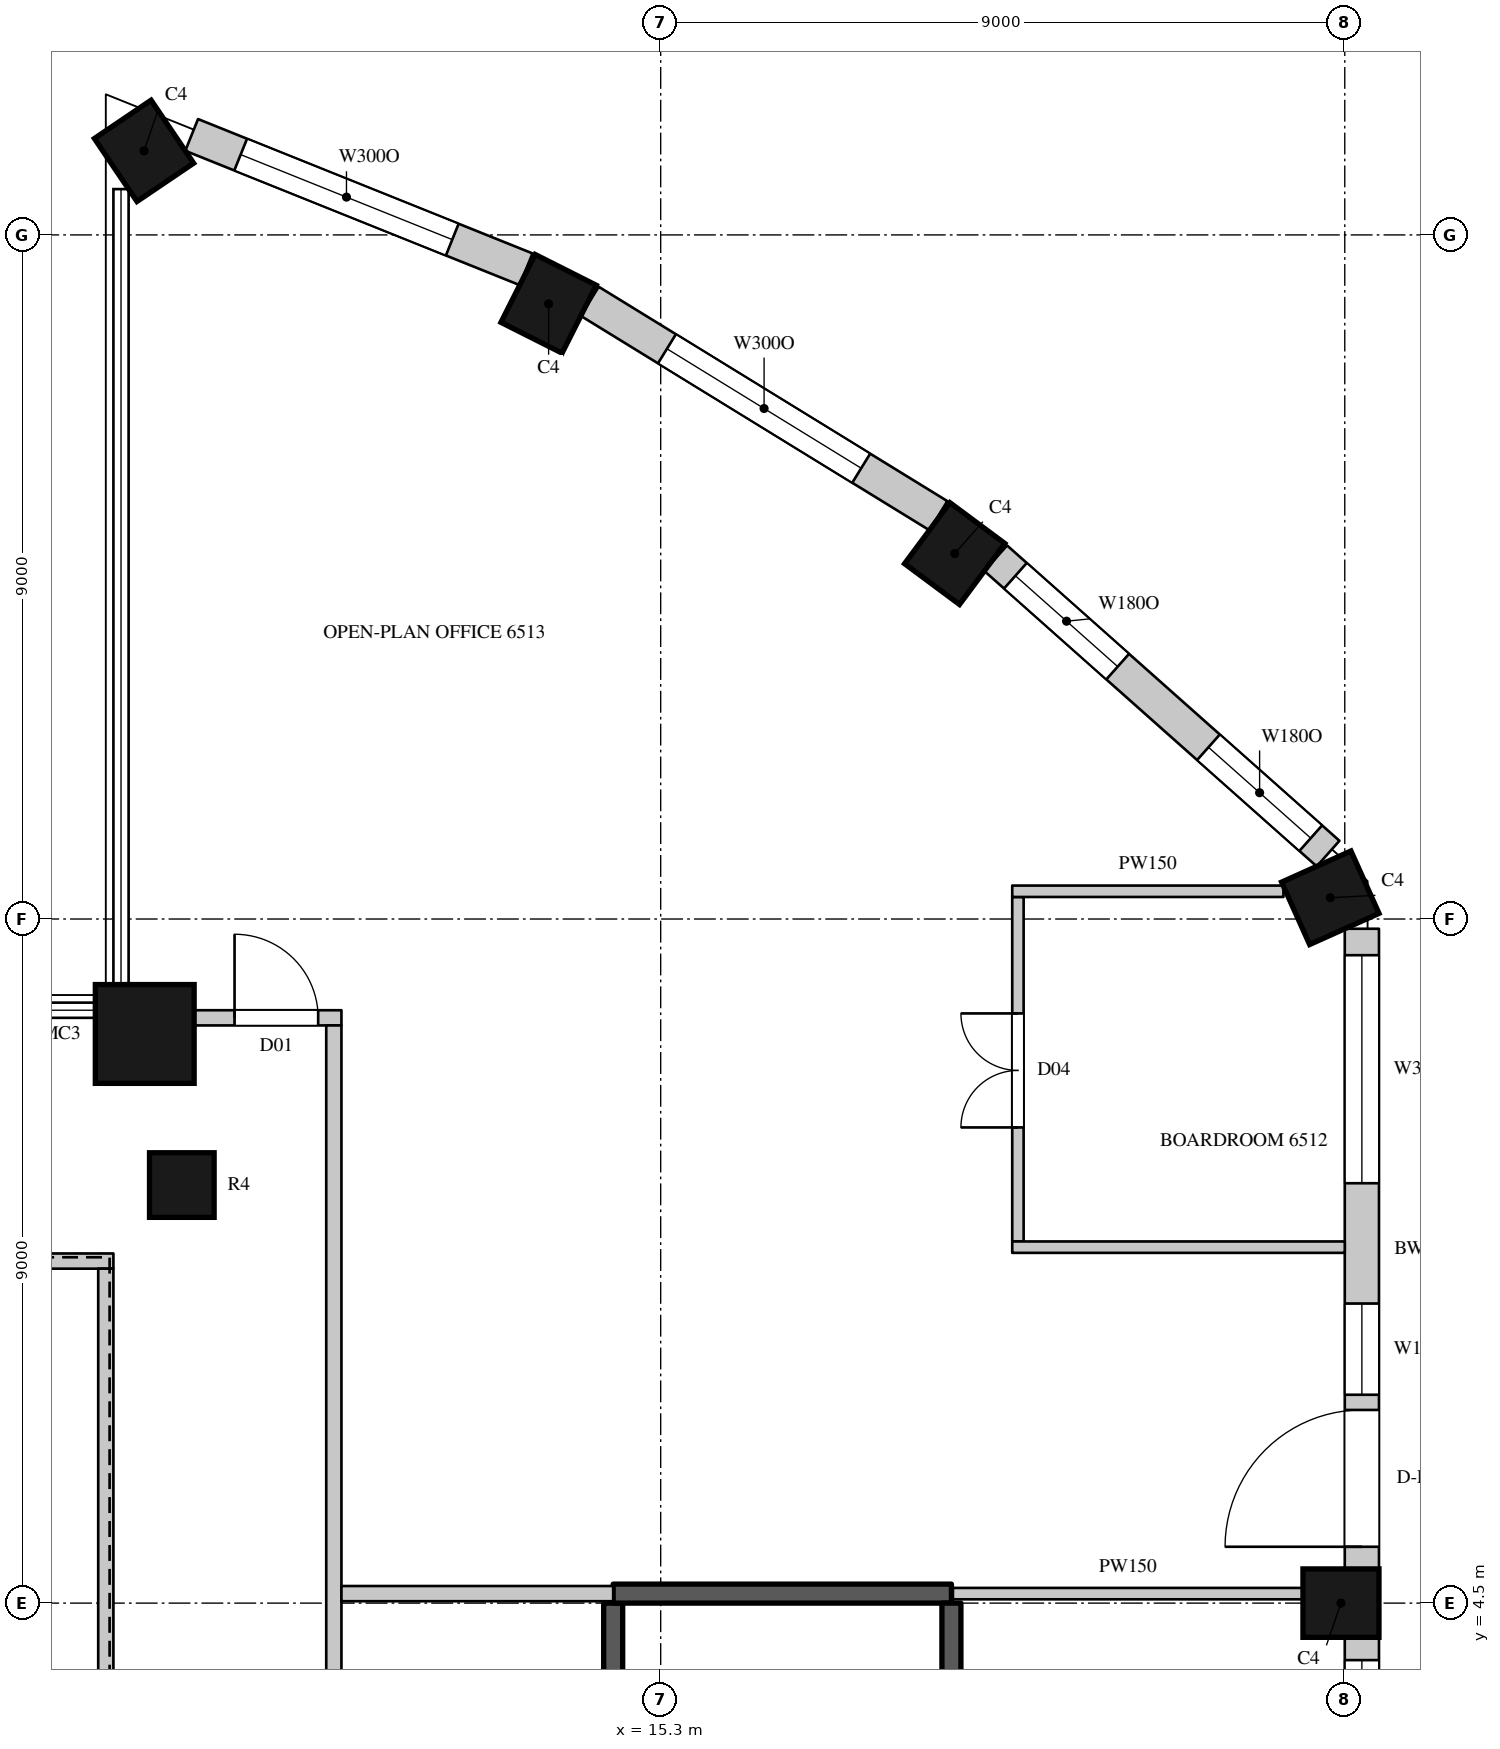
"""IFC4 building model, lengths in metres.
Left out: names, types, materials, properties, quantities, classifications, styles, units other than length and angle.
Written with IfcOpenShell. Run it as: python <this file> out.ifc"""

import sys

from ifc_helpers import new_model, si_unit, direction, frame, frame_2d, origin, origin_2d, place, context, subcontext, project, spatial, rectangle, circle, extrude, element, fill, save


model = new_model("IFC4")
c1 = context("Model", 3, precision=1e-05, world=origin(), true_north=direction((0.0, 1.0)))
c2 = subcontext(c1, "Body", "Model", "MODEL_VIEW")
j1 = project(units=[si_unit("LENGTHUNIT", "METRE"), si_unit("PLANEANGLEUNIT", "RADIAN")], contexts=[c1])
p1 = place(None, origin())
s1 = spatial("IfcSite", under=j1, at=p1, CompositionType="ELEMENT")
p2 = place(p1, origin())
s2 = spatial("IfcBuilding", under=s1, at=p2, CompositionType="ELEMENT")
p3 = place(p2, frame((0.0, 0.0, 288.5)))
s3 = spatial("IfcBuildingStorey", under=s2, at=p3, CompositionType="ELEMENT", Elevation=288.5)
p4 = place(p3, frame((8.503, 23.606, 0.0), z_axis=(0.0, 0.0, 1.0), x_axis=(-0.828469606019, -0.560034027451, 0.0)))
e1 = element("IfcColumn", 1, at=p4, inside=s3, PredefinedType="COLUMN", context=c2, shape_type="SweptSolid", body=[
    extrude(rectangle(XDim=0.9, YDim=1.0, at=origin_2d()), origin(), (0.0, 0.0, 1.0), 4.1),
])
p5 = place(p3, frame((8.512, 11.988, 0.0), z_axis=(0.0, 0.0, 1.0), x_axis=(1.0, 0.0, 0.0)))
e2 = element("IfcColumn", 2, at=p5, inside=s3, PredefinedType="COLUMN", context=c2, shape_type="SweptSolid", body=[
    extrude(circle(Radius=0.65, at=origin_2d()), origin(), (0.0, 0.0, 1.0), 4.1),
])
for number, where, z_axis, x_axis in (
    (3, (24.25, 4.5, 0.0), (0.0, 0.0, 1.0), (0.0, 1.0, 0.0)),
    (4, (24.11, 13.78, 0.0), (0.0, 0.0, 1.0), (-0.41, 0.912, 0.0)),
    (5, (19.168, 18.308, 0.0), (0.0, 0.0, 1.0), (-0.803, 0.596, 0.0)),
    (6, (13.826, 21.594, 0.0), (0.0, 0.0, 1.0), (-0.893, 0.45, 0.0)),
):
    element("IfcColumn", number, at=place(p3, frame(where, z_axis=z_axis, x_axis=x_axis)), inside=s3, PredefinedType="COLUMN", context=c2, shape_type="SweptSolid", body=[
        extrude(rectangle(XDim=0.9, YDim=1.0, at=origin_2d()), origin(), (0.0, 0.0, 1.0), 4.1),
    ])
p6 = place(p3, frame((9.0, 10.0, 0.0), z_axis=(0.0, 0.0, 1.0), x_axis=(1.0, 0.0, 0.0)))
e7 = element("IfcColumn", 7, at=p6, inside=s3, PredefinedType="COLUMN", context=c2, shape_type="SweptSolid", body=[
    extrude(circle(Radius=0.425, at=origin_2d()), origin(), (0.0, 0.0, 1.0), 4.1),
])
p7 = place(p3, frame((24.525, -4.05, 0.0), z_axis=(0.0, 0.0, 1.0), x_axis=(0.0, 1.0, 0.0)))
e8 = element("IfcWall", 8, at=p7, inside=s3, PredefinedType="SOLIDWALL", context=c2, shape_type="SweptSolid", body=[
    extrude(rectangle(XDim=8.1, YDim=0.45, at=frame_2d((4.05, 0.0))), origin(), (0.0, 0.0, 1.0), 3.8),
])
p8 = place(p7, frame((0.3, 0.0, 1.05)))
e9 = element("IfcOpeningElement", 9, at=p8, cuts=e8, PredefinedType="OPENING", context=c2, shape_type="SweptSolid", body=[
    extrude(rectangle(XDim=3.0, YDim=2.4, at=frame_2d((1.5, 1.2))), frame((0.0, 0.235, 0.0), z_axis=(0.0, -1.0, 0.0), x_axis=(1.0, 0.0, 0.0)), (0.0, 0.0, 1.0), 0.47),
])
p9 = place(p7, frame((4.8, 0.0, 1.05)))
e10 = element("IfcOpeningElement", 10, at=p9, cuts=e8, PredefinedType="OPENING", context=c2, shape_type="SweptSolid", body=[
    extrude(rectangle(XDim=3.0, YDim=2.4, at=frame_2d((1.5, 1.2))), frame((0.0, 0.235, 0.0), z_axis=(0.0, -1.0, 0.0), x_axis=(1.0, 0.0, 0.0)), (0.0, 0.0, 1.0), 0.47),
])
p10 = place(p3, frame((24.525, 4.95, 0.0), z_axis=(0.0, 0.0, 1.0), x_axis=(0.0, 1.0, 0.0)))
e11 = element("IfcWall", 11, at=p10, inside=s3, PredefinedType="SOLIDWALL", context=c2, shape_type="SweptSolid", body=[
    extrude(rectangle(XDim=8.422, YDim=0.45, at=frame_2d((4.211, 0.0))), origin(), (0.0, 0.0, 1.0), 3.8),
])
p11 = place(p10, frame((0.291, 0.0, 0.0)))
e12 = element("IfcOpeningElement", 12, at=p11, cuts=e11, PredefinedType="OPENING", context=c2, shape_type="SweptSolid", body=[
    extrude(rectangle(XDim=1.8, YDim=2.4, at=frame_2d((0.9, 1.2))), frame((0.0, 0.235, 0.0), z_axis=(0.0, -1.0, 0.0), x_axis=(1.0, 0.0, 0.0)), (0.0, 0.0, 1.0), 0.47),
])
p12 = place(p10, frame((2.291, 0.0, 1.05)))
e13 = element("IfcOpeningElement", 13, at=p12, cuts=e11, PredefinedType="OPENING", context=c2, shape_type="SweptSolid", body=[
    extrude(rectangle(XDim=1.2, YDim=2.4, at=frame_2d((0.6, 1.2))), frame((0.0, 0.235, 0.0), z_axis=(0.0, -1.0, 0.0), x_axis=(1.0, 0.0, 0.0)), (0.0, 0.0, 1.0), 0.47),
])
p13 = place(p10, frame((5.074, 0.0, 1.05)))
e14 = element("IfcOpeningElement", 14, at=p13, cuts=e11, PredefinedType="OPENING", context=c2, shape_type="SweptSolid", body=[
    extrude(rectangle(XDim=3.0, YDim=2.4, at=frame_2d((1.5, 1.2))), frame((0.0, 0.235, 0.0), z_axis=(0.0, -1.0, 0.0), x_axis=(1.0, 0.0, 0.0)), (0.0, 0.0, 1.0), 0.47),
])
p14 = place(p3, frame((24.081, 14.361, 0.0), z_axis=(0.0, 0.0, 1.0), x_axis=(-0.747570482973, 0.664182484704, 0.0)))
e15 = element("IfcWall", 15, at=p14, inside=s3, PredefinedType="SOLIDWALL", context=c2, shape_type="SweptSolid", body=[
    extrude(rectangle(XDim=5.85, YDim=0.45, at=frame_2d((2.925, 0.0))), origin(), (0.0, 0.0, 1.0), 3.8),
])
p15 = place(p14, frame((0.305, 0.0, 1.05)))
e16 = element("IfcOpeningElement", 16, at=p15, cuts=e15, PredefinedType="OPENING", context=c2, shape_type="SweptSolid", body=[
    extrude(rectangle(XDim=1.8, YDim=2.4, at=frame_2d((0.9, 1.2))), frame((0.0, 0.235, 0.0), z_axis=(0.0, -1.0, 0.0), x_axis=(1.0, 0.0, 0.0)), (0.0, 0.0, 1.0), 0.47),
])
p16 = place(p14, frame((3.703, 0.0, 1.05)))
e17 = element("IfcOpeningElement", 17, at=p16, cuts=e15, PredefinedType="OPENING", context=c2, shape_type="SweptSolid", body=[
    extrude(rectangle(XDim=1.8, YDim=2.4, at=frame_2d((0.9, 1.2))), frame((0.0, 0.235, 0.0), z_axis=(0.0, -1.0, 0.0), x_axis=(1.0, 0.0, 0.0)), (0.0, 0.0, 1.0), 0.47),
])
p17 = place(p3, frame((18.953, 18.806, 0.0), z_axis=(0.0, 0.0, 1.0), x_axis=(-0.851860664503, 0.523768468193, 0.0)))
e18 = element("IfcWall", 18, at=p17, inside=s3, PredefinedType="SOLIDWALL", context=c2, shape_type="SweptSolid", body=[
    extrude(rectangle(XDim=5.384, YDim=0.45, at=frame_2d((2.692, 0.0))), origin(), (0.0, 0.0, 1.0), 3.8),
])
p18 = place(p17, frame((1.192, 0.0, 1.05)))
e19 = element("IfcOpeningElement", 19, at=p18, cuts=e18, PredefinedType="OPENING", context=c2, shape_type="SweptSolid", body=[
    extrude(rectangle(XDim=3.0, YDim=2.4, at=frame_2d((1.5, 1.2))), frame((0.0, 0.235, 0.0), z_axis=(0.0, -1.0, 0.0), x_axis=(1.0, 0.0, 0.0)), (0.0, 0.0, 1.0), 0.47),
])
p19 = place(p3, frame((13.529, 22.048, 0.0), z_axis=(0.0, 0.0, 1.0), x_axis=(-0.927957332619, 0.372686448424, 0.0)))
e20 = element("IfcWall", 20, at=p19, inside=s3, PredefinedType="SOLIDWALL", context=c2, shape_type="SweptSolid", body=[
    extrude(rectangle(XDim=4.741, YDim=0.45, at=frame_2d((2.371, 0.0))), origin(), (0.0, 0.0, 1.0), 3.8),
])
p20 = place(p19, frame((1.047, 0.0, 1.05)))
e21 = element("IfcOpeningElement", 21, at=p20, cuts=e20, PredefinedType="OPENING", context=c2, shape_type="SweptSolid", body=[
    extrude(rectangle(XDim=3.0, YDim=2.4, at=frame_2d((1.5, 1.2))), frame((0.0, 0.235, 0.0), z_axis=(0.0, -1.0, 0.0), x_axis=(1.0, 0.0, 0.0)), (0.0, 0.0, 1.0), 0.47),
])
p21 = place(p3, frame((-2.48, 9.0, 0.0), z_axis=(0.0, 0.0, 1.0), x_axis=(1.0, 0.0, 0.0)))
e22 = element("IfcWall", 22, at=p21, inside=s3, PredefinedType="PARTITIONING", context=c2, shape_type="SweptSolid", body=[
    extrude(rectangle(XDim=10.58, YDim=0.2, at=frame_2d((5.29, 0.0))), origin(), (0.0, 0.0, 1.0), 3.8),
])
p22 = place(p3, frame((8.0, -8.9, 0.0), z_axis=(0.0, 0.0, 1.0), x_axis=(0.0, 1.0, 0.0)))
e23 = element("IfcWall", 23, at=p22, inside=s3, PredefinedType="PARTITIONING", context=c2, shape_type="SweptSolid", body=[
    extrude(rectangle(XDim=17.8, YDim=0.2, at=frame_2d((8.9, 0.0))), origin(), (0.0, 0.0, 1.0), 3.8),
])
p23 = place(p3, frame((9.144, 12.2, 0.0), z_axis=(0.0, 0.0, 1.0), x_axis=(1.0, 0.0, 0.0)))
e24 = element("IfcWall", 24, at=p23, inside=s3, PredefinedType="PARTITIONING", context=c2, shape_type="SweptSolid", body=[
    extrude(rectangle(XDim=1.956, YDim=0.2, at=frame_2d((0.978, 0.0))), origin(), (0.0, 0.0, 1.0), 3.8),
])
p24 = place(p23, frame((0.55, 0.0, 0.0)))
e25 = element("IfcOpeningElement", 25, at=p24, cuts=e24, PredefinedType="OPENING", context=c2, shape_type="SweptSolid", body=[
    extrude(rectangle(XDim=1.1, YDim=2.4, at=frame_2d((0.55, 1.2))), frame((0.0, 0.11, 0.0), z_axis=(0.0, -1.0, 0.0), x_axis=(1.0, 0.0, 0.0)), (0.0, 0.0, 1.0), 0.22),
])
p25 = place(p3, frame((11.0, -12.0, 0.0), z_axis=(0.0, 0.0, 1.0), x_axis=(0.0, 1.0, 0.0)))
e26 = element("IfcWall", 26, at=p25, inside=s3, PredefinedType="PARTITIONING", context=c2, shape_type="SweptSolid", body=[
    extrude(rectangle(XDim=24.1, YDim=0.2, at=frame_2d((12.05, 0.0))), origin(), (0.0, 0.0, 1.0), 3.8),
])
p26 = place(p25, frame((9.85, 0.0, 0.0)))
e27 = element("IfcOpeningElement", 27, at=p26, cuts=e26, PredefinedType="OPENING", context=c2, shape_type="SweptSolid", body=[
    extrude(rectangle(XDim=1.5, YDim=2.4, at=frame_2d((0.75, 1.2))), frame((0.0, 0.11, 0.0), z_axis=(0.0, -1.0, 0.0), x_axis=(1.0, 0.0, 0.0)), (0.0, 0.0, 1.0), 0.22),
])
p27 = place(p25, frame((4.55, 0.0, 0.0)))
e28 = element("IfcOpeningElement", 28, at=p27, cuts=e26, PredefinedType="OPENING", context=c2, shape_type="SweptSolid", body=[
    extrude(rectangle(XDim=1.1, YDim=2.4, at=frame_2d((0.55, 1.2))), frame((0.0, 0.11, 0.0), z_axis=(0.0, -1.0, 0.0), x_axis=(1.0, 0.0, 0.0)), (0.0, 0.0, 1.0), 0.22),
])
p28 = place(p3, frame((11.1, 4.625, 0.0), z_axis=(0.0, 0.0, 1.0), x_axis=(1.0, 0.0, 0.0)))
e29 = element("IfcWall", 29, at=p28, inside=s3, PredefinedType="PARTITIONING", context=c2, shape_type="SweptSolid", body=[
    extrude(rectangle(XDim=3.575, YDim=0.2, at=frame_2d((1.788, 0.0))), origin(), (0.0, 0.0, 1.0), 3.8),
])
p29 = place(p3, frame((19.145, 4.625, 0.0), z_axis=(0.0, 0.0, 1.0), x_axis=(1.0, 0.0, 0.0)))
e30 = element("IfcWall", 30, at=p29, inside=s3, PredefinedType="PARTITIONING", context=c2, shape_type="SweptSolid", body=[
    extrude(rectangle(XDim=4.605, YDim=0.15, at=frame_2d((2.302, 0.0))), origin(), (0.0, 0.0, 1.0), 3.8),
])
p30 = place(p3, frame((20.0, 9.258, 0.0), z_axis=(0.0, 0.0, 1.0), x_axis=(0.0, 1.0, 0.0)))
e31 = element("IfcWall", 31, at=p30, inside=s3, PredefinedType="PARTITIONING", context=c2, shape_type="SweptSolid", body=[
    extrude(rectangle(XDim=4.532, YDim=0.15, at=frame_2d((2.266, 0.0))), origin(), (0.0, 0.0, 1.0), 3.8),
])
p31 = place(p30, frame((1.5, 0.0, 0.0)))
e32 = element("IfcOpeningElement", 32, at=p31, cuts=e31, PredefinedType="OPENING", context=c2, shape_type="SweptSolid", body=[
    extrude(rectangle(XDim=1.5, YDim=2.2, at=frame_2d((0.75, 1.1))), frame((0.0, 0.085, 0.0), z_axis=(0.0, -1.0, 0.0), x_axis=(1.0, 0.0, 0.0)), (0.0, 0.0, 1.0), 0.17),
])
p32 = place(p3, frame((19.925, 9.183, 0.0), z_axis=(0.0, 0.0, 1.0), x_axis=(1.0, 0.0, 0.0)))
e33 = element("IfcWall", 33, at=p32, inside=s3, PredefinedType="PARTITIONING", context=c2, shape_type="SweptSolid", body=[
    extrude(rectangle(XDim=4.375, YDim=0.15, at=frame_2d((2.188, 0.0))), origin(), (0.0, 0.0, 1.0), 3.15),
])
p33 = place(p3, frame((19.925, 13.865, 0.0), z_axis=(0.0, 0.0, 1.0), x_axis=(1.0, 0.0, 0.0)))
e34 = element("IfcWall", 34, at=p33, inside=s3, PredefinedType="PARTITIONING", context=c2, shape_type="SweptSolid", body=[
    extrude(rectangle(XDim=3.568, YDim=0.15, at=frame_2d((1.784, 0.0))), origin(), (0.0, 0.0, 1.0), 3.8),
])
p34 = place(p3, frame((14.675, -4.5, 0.0), z_axis=(0.0, 0.0, 1.0), x_axis=(0.0, 1.0, 0.0)))
e35 = element("IfcWall", 35, at=p34, inside=s3, PredefinedType="SHEAR", context=c2, shape_type="SweptSolid", body=[
    extrude(rectangle(XDim=9.0, YDim=0.25, at=frame_2d((4.5, 0.0))), origin(), (0.0, 0.0, 1.0), 3.8),
])
p35 = place(p34, frame((0.45, 0.0, 0.0)))
e36 = element("IfcOpeningElement", 36, at=p35, cuts=e35, PredefinedType="OPENING", context=c2, shape_type="SweptSolid", body=[
    extrude(rectangle(XDim=1.1, YDim=2.2, at=frame_2d((0.55, 1.1))), frame((0.0, 0.135, 0.0), z_axis=(0.0, -1.0, 0.0), x_axis=(1.0, 0.0, 0.0)), (0.0, 0.0, 1.0), 0.27),
])
p36 = place(p3, frame((14.675, 4.625, 0.0), z_axis=(0.0, 0.0, 1.0), x_axis=(1.0, 0.0, 0.0)))
e37 = element("IfcWall", 37, at=p36, inside=s3, PredefinedType="SHEAR", context=c2, shape_type="SweptSolid", body=[
    extrude(rectangle(XDim=4.45, YDim=0.25, at=frame_2d((2.225, 0.0))), origin(), (0.0, 0.0, 1.0), 3.8),
])
p37 = place(p3, frame((19.125, -4.5, 0.0), z_axis=(0.0, 0.0, 1.0), x_axis=(0.0, 1.0, 0.0)))
e38 = element("IfcWall", 38, at=p37, inside=s3, PredefinedType="SHEAR", context=c2, shape_type="SweptSolid", body=[
    extrude(rectangle(XDim=9.0, YDim=0.25, at=frame_2d((4.5, 0.0))), origin(), (0.0, 0.0, 1.0), 3.8),
])
p38 = place(p9, origin())
e39 = element("IfcWindow", 39, at=p38, inside=s3, PartitioningType="SINGLE_PANEL", PredefinedType="WINDOW", context=c2, shape_type="SweptSolid", body=[
    extrude(rectangle(XDim=3.0, YDim=2.4, at=frame_2d((1.5, 1.2))), frame((0.0, 0.135, 0.0), z_axis=(0.0, -1.0, 0.0), x_axis=(1.0, 0.0, 0.0)), (0.0, 0.0, 1.0), 0.06),
])
fill(e10, e39)
p39 = place(p11, origin())
e40 = element("IfcDoor", 40, at=p39, inside=s3, OperationType="SLIDING_TO_LEFT", PredefinedType="DOOR", context=c2, shape_type="SweptSolid", body=[
    extrude(rectangle(XDim=1.8, YDim=2.4, at=frame_2d((0.9, 1.2))), frame((0.0, 0.13, 0.0), z_axis=(0.0, -1.0, 0.0), x_axis=(1.0, 0.0, 0.0)), (0.0, 0.0, 1.0), 0.05),
])
fill(e12, e40)
p40 = place(p12, origin())
e41 = element("IfcWindow", 41, at=p40, inside=s3, PartitioningType="SINGLE_PANEL", PredefinedType="WINDOW", context=c2, shape_type="SweptSolid", body=[
    extrude(rectangle(XDim=1.2, YDim=2.4, at=frame_2d((0.6, 1.2))), frame((0.0, 0.135, 0.0), z_axis=(0.0, -1.0, 0.0), x_axis=(1.0, 0.0, 0.0)), (0.0, 0.0, 1.0), 0.06),
])
fill(e13, e41)
p41 = place(p13, origin())
e42 = element("IfcWindow", 42, at=p41, inside=s3, PartitioningType="SINGLE_PANEL", PredefinedType="WINDOW", context=c2, shape_type="SweptSolid", body=[
    extrude(rectangle(XDim=3.0, YDim=2.4, at=frame_2d((1.5, 1.2))), frame((0.0, 0.135, 0.0), z_axis=(0.0, -1.0, 0.0), x_axis=(1.0, 0.0, 0.0)), (0.0, 0.0, 1.0), 0.06),
])
fill(e14, e42)
p42 = place(p15, origin())
e43 = element("IfcWindow", 43, at=p42, inside=s3, PartitioningType="SINGLE_PANEL", PredefinedType="WINDOW", context=c2, shape_type="SweptSolid", body=[
    extrude(rectangle(XDim=1.8, YDim=2.4, at=frame_2d((0.9, 1.2))), frame((0.0, 0.135, 0.0), z_axis=(0.0, -1.0, 0.0), x_axis=(1.0, 0.0, 0.0)), (0.0, 0.0, 1.0), 0.06),
])
fill(e16, e43)
p43 = place(p16, origin())
e44 = element("IfcWindow", 44, at=p43, inside=s3, PartitioningType="SINGLE_PANEL", PredefinedType="WINDOW", context=c2, shape_type="SweptSolid", body=[
    extrude(rectangle(XDim=1.8, YDim=2.4, at=frame_2d((0.9, 1.2))), frame((0.0, 0.135, 0.0), z_axis=(0.0, -1.0, 0.0), x_axis=(1.0, 0.0, 0.0)), (0.0, 0.0, 1.0), 0.06),
])
fill(e17, e44)
p44 = place(p18, origin())
e45 = element("IfcWindow", 45, at=p44, inside=s3, PartitioningType="SINGLE_PANEL", PredefinedType="WINDOW", context=c2, shape_type="SweptSolid", body=[
    extrude(rectangle(XDim=3.0, YDim=2.4, at=frame_2d((1.5, 1.2))), frame((0.0, 0.135, 0.0), z_axis=(0.0, -1.0, 0.0), x_axis=(1.0, 0.0, 0.0)), (0.0, 0.0, 1.0), 0.06),
])
fill(e19, e45)
p45 = place(p20, origin())
e46 = element("IfcWindow", 46, at=p45, inside=s3, PartitioningType="SINGLE_PANEL", PredefinedType="WINDOW", context=c2, shape_type="SweptSolid", body=[
    extrude(rectangle(XDim=3.0, YDim=2.4, at=frame_2d((1.5, 1.2))), frame((0.0, 0.135, 0.0), z_axis=(0.0, -1.0, 0.0), x_axis=(1.0, 0.0, 0.0)), (0.0, 0.0, 1.0), 0.06),
])
fill(e21, e46)
p46 = place(p24, origin())
e47 = element("IfcDoor", 47, at=p46, inside=s3, OperationType="SINGLE_SWING_LEFT", PredefinedType="DOOR", context=c2, shape_type="SweptSolid", body=[
    extrude(rectangle(XDim=1.1, YDim=2.4, at=frame_2d((0.55, 1.2))), frame((0.0, 0.025, 0.0), z_axis=(0.0, -1.0, 0.0), x_axis=(1.0, 0.0, 0.0)), (0.0, 0.0, 1.0), 0.05),
])
fill(e25, e47)
p47 = place(p31, origin())
e48 = element("IfcDoor", 48, at=p47, inside=s3, OperationType="DOUBLE_DOOR_SINGLE_SWING", PredefinedType="DOOR", context=c2, shape_type="SweptSolid", body=[
    extrude(rectangle(XDim=1.5, YDim=2.2, at=frame_2d((0.75, 1.1))), frame((0.0, 0.025, 0.0), z_axis=(0.0, -1.0, 0.0), x_axis=(1.0, 0.0, 0.0)), (0.0, 0.0, 1.0), 0.05),
])
fill(e32, e48)
save(model, sys.argv[1])
